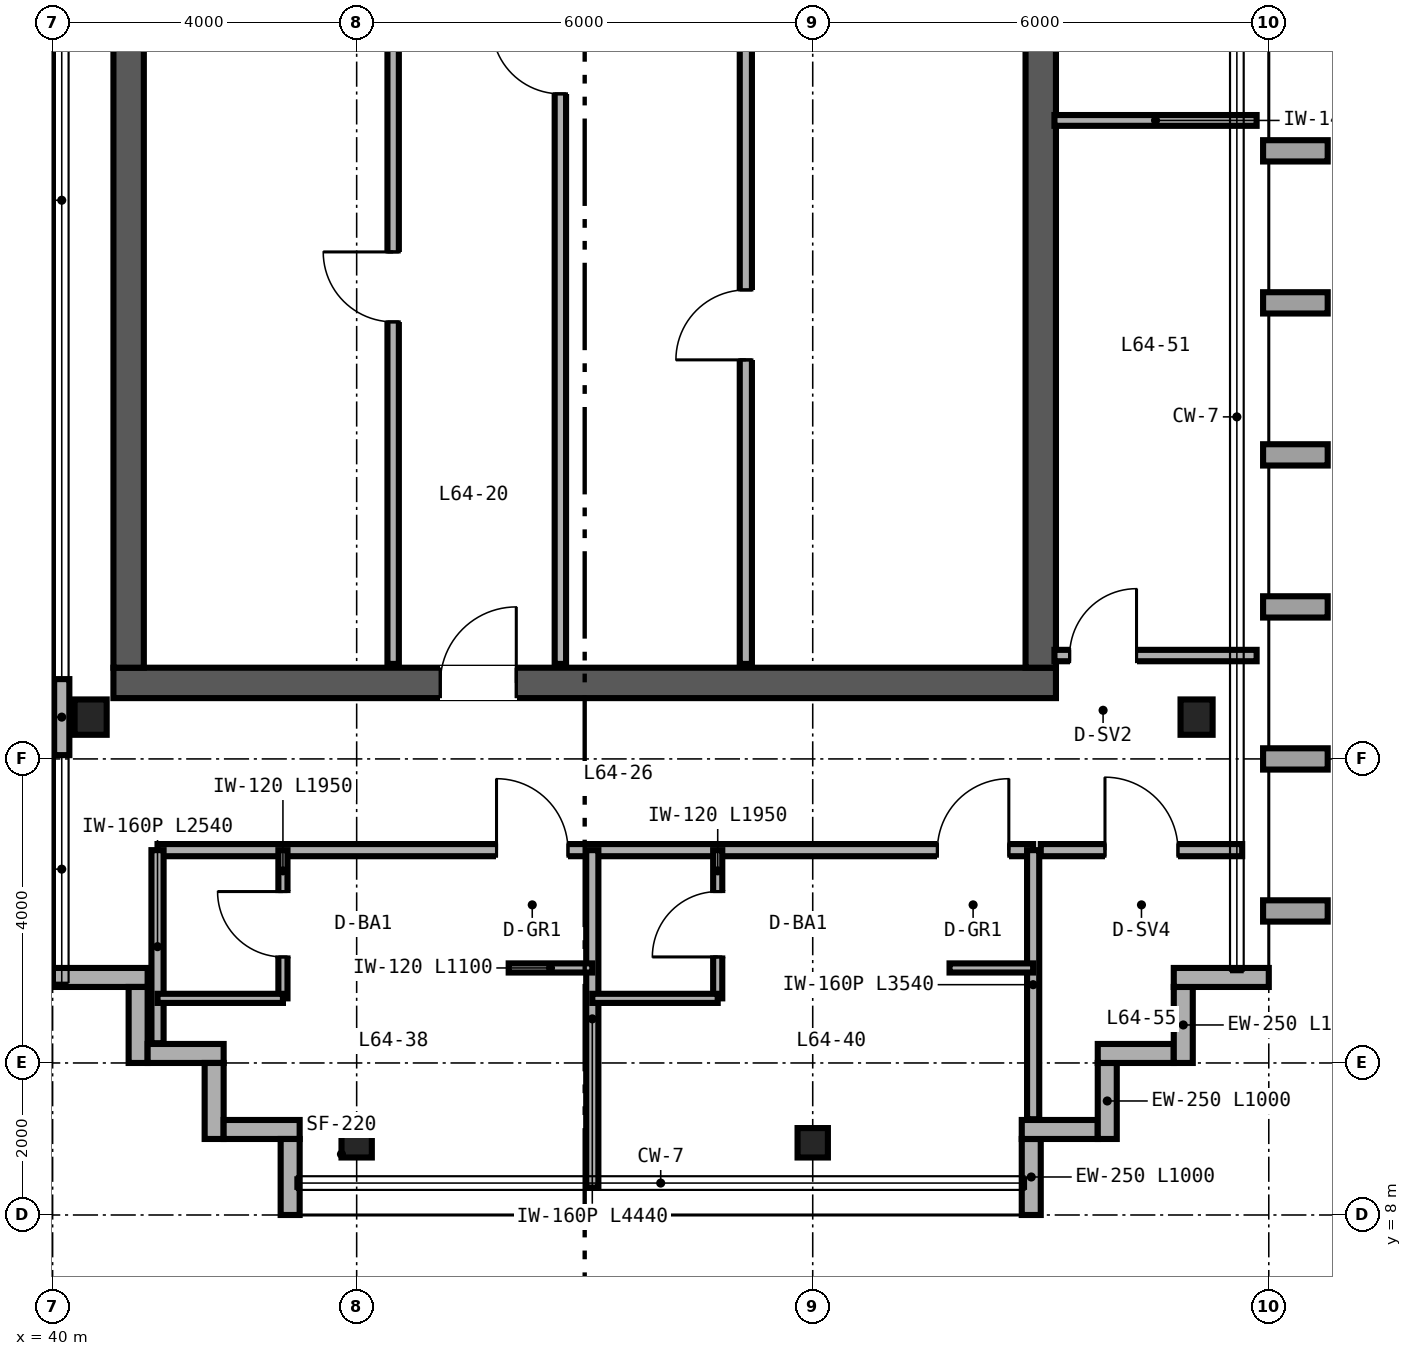
"""IFC4 building model, lengths in metres.
Left out: names, types, materials, properties, quantities, classifications, styles, units other than length and angle.
Written with IfcOpenShell. Run it as: python <this file> out.ifc"""

import sys

from ifc_helpers import new_model, si_unit, direction, frame, frame_2d, origin, origin_2d, place, context, subcontext, project, spatial, rectangle, i_section, extrude, source, transform, mapped, element, fill, save


model = new_model("IFC4")
c1 = context("Model", 3, precision=1e-05, world=origin(), true_north=direction((0.0, 1.0)))
c2 = subcontext(c1, "Body", "Model", "MODEL_VIEW")
j1 = project(units=[si_unit("LENGTHUNIT", "METRE"), si_unit("PLANEANGLEUNIT", "RADIAN")], contexts=[c1])
p1 = place(None, origin())
s1 = spatial("IfcSite", under=j1, at=p1, CompositionType="ELEMENT")
p2 = place(p1, origin())
s2 = spatial("IfcBuilding", under=s1, at=p2, CompositionType="ELEMENT")
p3 = place(p2, frame((0.0, 0.0, 254.4)))
s3 = spatial("IfcBuildingStorey", under=s2, at=p3, CompositionType="ELEMENT", Elevation=254.4)
p4 = place(p3, frame((40.8, 15.0, 0.0), z_axis=(0.0, 0.0, 1.0), x_axis=(1.0, 0.0, 0.0)))
e1 = element("IfcWall", 1, at=p4, inside=s3, PredefinedType="SHEAR", context=c2, shape_type="SweptSolid", body=[
    extrude(rectangle(XDim=12.4, YDim=0.4, at=frame_2d((6.2, 0.0))), origin(), (0.0, 0.0, 1.0), 3.38),
])
p5 = place(p4, frame((4.3, 0.0, 0.0)))
e2 = element("IfcOpeningElement", 2, at=p5, cuts=e1, PredefinedType="OPENING", context=c2, shape_type="SweptSolid", body=[
    extrude(rectangle(XDim=1.0, YDim=2.15, at=frame_2d((0.5, 1.075))), frame((0.0, 0.21, 0.0), z_axis=(0.0, -1.0, 0.0), x_axis=(1.0, 0.0, 0.0)), (0.0, 0.0, 1.0), 0.42),
])
for number, where, z_axis, x_axis in (
    (3, (41.0, 15.2, 0.0), (0.0, 0.0, 1.0), (0.0, 1.0, 0.0)),
    (4, (53.0, 15.2, 0.0), (0.0, 0.0, 1.0), (0.0, 1.0, 0.0)),
):
    element("IfcWall", number, at=place(p3, frame(where, z_axis=z_axis, x_axis=x_axis)), inside=s3, PredefinedType="SHEAR", context=c2, shape_type="SweptSolid", body=[
        extrude(rectangle(XDim=21.6, YDim=0.4, at=frame_2d((10.8, 0.0))), origin(), (0.0, 0.0, 1.0), 3.38),
    ])
m1 = source(origin(), c2, "Body", "SweptSolid", [
    extrude(i_section(OverallWidth=0.422, OverallDepth=0.465, WebThickness=0.045, FlangeThickness=0.073, FilletRadius=0.025, at=origin_2d()), origin(), (0.0, 0.0, 1.0), 3.38),
])
for number, where, z_axis, x_axis in (
    (5, (40.5, 14.55, 0.0), (0.0, 0.0, 1.0), (1.0, 0.0, 0.0)),
    (6, (55.05, 14.55, 0.0), (0.0, 0.0, 1.0), (1.0, 0.0, 0.0)),
):
    element("IfcColumn", number, at=place(p3, frame(where, z_axis=z_axis, x_axis=x_axis)), inside=s3, PredefinedType="COLUMN", context=c2, shape_type="MappedRepresentation", body=[
        mapped(m1, transform((0.0, 0.0, 0.0), scale=1.0)),
    ])
m2 = source(origin(), c2, "Body", "SweptSolid", [
    extrude(i_section(OverallWidth=0.399, OverallDepth=0.387, WebThickness=0.021, FlangeThickness=0.033, FilletRadius=0.025, at=origin_2d()), origin(), (0.0, 0.0, 1.0), 3.38),
])
for number, where, z_axis, x_axis in (
    (7, (44.0, 8.95, 0.0), (0.0, 0.0, 1.0), (1.0, 0.0, 0.0)),
    (8, (50.0, 8.95, 0.0), (0.0, 0.0, 1.0), (1.0, 0.0, 0.0)),
):
    element("IfcColumn", number, at=place(p3, frame(where, z_axis=z_axis, x_axis=x_axis)), inside=s3, PredefinedType="COLUMN", context=c2, shape_type="MappedRepresentation", body=[
        mapped(m2, transform((0.0, 0.0, 0.0), scale=1.0)),
    ])
for number, where, z_axis, x_axis in (
    (9, (52.875, 8.0, 0.0), (0.0, 0.0, 1.0), (0.0, 1.0, 0.0)),
    (10, (52.75, 9.125, 0.0), (0.0, 0.0, 1.0), (1.0, 0.0, 0.0)),
    (11, (53.875, 9.0, 0.0), (0.0, 0.0, 1.0), (0.0, 1.0, 0.0)),
    (12, (53.75, 10.125, 0.0), (0.0, 0.0, 1.0), (1.0, 0.0, 0.0)),
    (13, (54.875, 10.0, 0.0), (0.0, 0.0, 1.0), (0.0, 1.0, 0.0)),
):
    element("IfcWall", number, at=place(p3, frame(where, z_axis=z_axis, x_axis=x_axis)), inside=s3, PredefinedType="SOLIDWALL", context=c2, shape_type="SweptSolid", body=[
        extrude(rectangle(XDim=1.0, YDim=0.25, at=frame_2d((0.5, 0.0))), origin(), (0.0, 0.0, 1.0), 3.38),
    ])
for number, where, z_axis, x_axis in (
    (14, (54.75, 11.125, 0.0), (0.0, 0.0, 1.0), (1.0, 0.0, 0.0)),
    (15, (40.0, 11.125, 0.0), (0.0, 0.0, 1.0), (1.0, 0.0, 0.0)),
):
    element("IfcWall", number, at=place(p3, frame(where, z_axis=z_axis, x_axis=x_axis)), inside=s3, PredefinedType="SOLIDWALL", context=c2, shape_type="SweptSolid", body=[
        extrude(rectangle(XDim=1.25, YDim=0.25, at=frame_2d((0.625, 0.0))), origin(), (0.0, 0.0, 1.0), 3.38),
    ])
for number, where, z_axis, x_axis in (
    (16, (41.125, 11.0, 0.0), (0.0, 0.0, 1.0), (0.0, -1.0, 0.0)),
    (17, (41.25, 10.125, 0.0), (0.0, 0.0, 1.0), (1.0, 0.0, 0.0)),
    (18, (42.125, 10.0, 0.0), (0.0, 0.0, 1.0), (0.0, -1.0, 0.0)),
    (19, (42.25, 9.125, 0.0), (0.0, 0.0, 1.0), (1.0, 0.0, 0.0)),
    (20, (43.125, 9.0, 0.0), (0.0, 0.0, 1.0), (0.0, -1.0, 0.0)),
):
    element("IfcWall", number, at=place(p3, frame(where, z_axis=z_axis, x_axis=x_axis)), inside=s3, PredefinedType="SOLIDWALL", context=c2, shape_type="SweptSolid", body=[
        extrude(rectangle(XDim=1.0, YDim=0.25, at=frame_2d((0.5, 0.0))), origin(), (0.0, 0.0, 1.0), 3.38),
    ])
p6 = place(p3, frame((40.12, 14.05, 0.0), z_axis=(0.0, 0.0, 1.0), x_axis=(0.0, 1.0, 0.0)))
e21 = element("IfcWall", 21, at=p6, inside=s3, PredefinedType="PARAPET", context=c2, shape_type="SweptSolid", body=[
    extrude(rectangle(XDim=1.0, YDim=0.2, at=frame_2d((0.5, 0.0))), origin(), (0.0, 0.0, 1.0), 3.38),
])
p7 = place(p3, frame((46.68, 15.25, 0.0), z_axis=(0.0, 0.0, 1.0), x_axis=(0.0, 1.0, 0.0)))
e22 = element("IfcWall", 22, at=p7, inside=s3, PredefinedType="PARTITIONING", context=c2, shape_type="SweptSolid", body=[
    extrude(rectangle(XDim=16.13, YDim=0.15, at=frame_2d((8.065, 0.0))), origin(), (0.0, 0.0, 1.0), 2.453),
])
p8 = place(p7, frame((7.5, 0.0, 0.0)))
e23 = element("IfcOpeningElement", 23, at=p8, cuts=e22, PredefinedType="OPENING", context=c2, shape_type="SweptSolid", body=[
    extrude(rectangle(XDim=0.9, YDim=2.15, at=frame_2d((0.45, 1.075))), frame((0.0, 0.085, 0.0), z_axis=(0.0, -1.0, 0.0), x_axis=(1.0, 0.0, 0.0)), (0.0, 0.0, 1.0), 0.17),
])
p9 = place(p3, frame((49.12, 15.25, 0.0), z_axis=(0.0, 0.0, 1.0), x_axis=(0.0, 1.0, 0.0)))
e24 = element("IfcWall", 24, at=p9, inside=s3, PredefinedType="PARTITIONING", context=c2, shape_type="SweptSolid", body=[
    extrude(rectangle(XDim=16.13, YDim=0.16, at=frame_2d((8.065, 0.0))), origin(), (0.0, 0.0, 1.0), 2.453),
])
p10 = place(p9, frame((4.0, 0.0, 0.0)))
e25 = element("IfcOpeningElement", 25, at=p10, cuts=e24, PredefinedType="OPENING", context=c2, shape_type="SweptSolid", body=[
    extrude(rectangle(XDim=0.92, YDim=2.15, at=frame_2d((0.46, 1.075))), frame((0.0, 0.09, 0.0), z_axis=(0.0, -1.0, 0.0), x_axis=(1.0, 0.0, 0.0)), (0.0, 0.0, 1.0), 0.18),
])
p11 = place(p9, frame((12.0, 0.0, 0.0)))
e26 = element("IfcOpeningElement", 26, at=p11, cuts=e24, PredefinedType="OPENING", context=c2, shape_type="SweptSolid", body=[
    extrude(rectangle(XDim=0.92, YDim=2.15, at=frame_2d((0.46, 1.075))), frame((0.0, 0.09, 0.0), z_axis=(0.0, -1.0, 0.0), x_axis=(1.0, 0.0, 0.0)), (0.0, 0.0, 1.0), 0.18),
])
p12 = place(p3, frame((44.48, 15.25, 0.0), z_axis=(0.0, 0.0, 1.0), x_axis=(0.0, 1.0, 0.0)))
e27 = element("IfcWall", 27, at=p12, inside=s3, PredefinedType="PARTITIONING", context=c2, shape_type="SweptSolid", body=[
    extrude(rectangle(XDim=16.13, YDim=0.15, at=frame_2d((8.065, 0.0))), origin(), (0.0, 0.0, 1.0), 2.453),
])
p13 = place(p12, frame((4.5, 0.0, 0.0)))
e28 = element("IfcOpeningElement", 28, at=p13, cuts=e27, PredefinedType="OPENING", context=c2, shape_type="SweptSolid", body=[
    extrude(rectangle(XDim=0.92, YDim=2.15, at=frame_2d((0.46, 1.075))), frame((0.0, 0.085, 0.0), z_axis=(0.0, -1.0, 0.0), x_axis=(1.0, 0.0, 0.0)), (0.0, 0.0, 1.0), 0.17),
])
p14 = place(p3, frame((41.38, 12.8, 0.0), z_axis=(0.0, 0.0, 1.0), x_axis=(1.0, 0.0, 0.0)))
e29 = element("IfcWall", 29, at=p14, inside=s3, PredefinedType="PARTITIONING", context=c2, shape_type="SweptSolid", body=[
    extrude(rectangle(XDim=11.52, YDim=0.16, at=frame_2d((5.76, 0.0))), origin(), (0.0, 0.0, 1.0), 3.38),
])
p15 = place(p14, frame((4.46, 0.0, 0.0)))
e30 = element("IfcOpeningElement", 30, at=p15, cuts=e29, PredefinedType="OPENING", context=c2, shape_type="SweptSolid", body=[
    extrude(rectangle(XDim=0.94, YDim=2.15, at=frame_2d((0.47, 1.075))), frame((0.0, 0.09, 0.0), z_axis=(0.0, -1.0, 0.0), x_axis=(1.0, 0.0, 0.0)), (0.0, 0.0, 1.0), 0.18),
])
p16 = place(p14, frame((10.26, 0.0, 0.0)))
e31 = element("IfcOpeningElement", 31, at=p16, cuts=e29, PredefinedType="OPENING", context=c2, shape_type="SweptSolid", body=[
    extrude(rectangle(XDim=0.94, YDim=2.15, at=frame_2d((0.47, 1.075))), frame((0.0, 0.09, 0.0), z_axis=(0.0, -1.0, 0.0), x_axis=(1.0, 0.0, 0.0)), (0.0, 0.0, 1.0), 0.18),
])
p17 = place(p3, frame((41.38, 10.26, 0.0), z_axis=(0.0, 0.0, 1.0), x_axis=(0.0, 1.0, 0.0)))
e32 = element("IfcWall", 32, at=p17, inside=s3, PredefinedType="PARTITIONING", context=c2, shape_type="SweptSolid", body=[
    extrude(rectangle(XDim=2.54, YDim=0.16, at=frame_2d((1.27, 0.0))), origin(), (0.0, 0.0, 1.0), 3.38),
])
p18 = place(p3, frame((52.9, 9.26, 0.0), z_axis=(0.0, 0.0, 1.0), x_axis=(0.0, 1.0, 0.0)))
e33 = element("IfcWall", 33, at=p18, inside=s3, PredefinedType="PARTITIONING", context=c2, shape_type="SweptSolid", body=[
    extrude(rectangle(XDim=3.54, YDim=0.16, at=frame_2d((1.77, 0.0))), origin(), (0.0, 0.0, 1.0), 3.38),
])
p19 = place(p3, frame((47.1, 8.36, 0.0), z_axis=(0.0, 0.0, 1.0), x_axis=(0.0, 1.0, 0.0)))
e34 = element("IfcWall", 34, at=p19, inside=s3, PredefinedType="PARTITIONING", context=c2, shape_type="SweptSolid", body=[
    extrude(rectangle(XDim=4.44, YDim=0.16, at=frame_2d((2.22, 0.0))), origin(), (0.0, 0.0, 1.0), 2.687),
])
p20 = place(p3, frame((43.03, 10.85, 0.0), z_axis=(0.0, 0.0, 1.0), x_axis=(0.0, 1.0, 0.0)))
e35 = element("IfcWall", 35, at=p20, inside=s3, PredefinedType="PARTITIONING", context=c2, shape_type="SweptSolid", body=[
    extrude(rectangle(XDim=1.95, YDim=0.12, at=frame_2d((0.975, 0.0))), origin(), (0.0, 0.0, 1.0), 3.38),
])
p21 = place(p20, frame((0.545, 0.0, 0.0)))
e36 = element("IfcOpeningElement", 36, at=p21, cuts=e35, PredefinedType="OPENING", context=c2, shape_type="SweptSolid", body=[
    extrude(rectangle(XDim=0.86, YDim=2.1, at=frame_2d((0.43, 1.05))), frame((0.0, 0.07, 0.0), z_axis=(0.0, -1.0, 0.0), x_axis=(1.0, 0.0, 0.0)), (0.0, 0.0, 1.0), 0.14),
])
p22 = place(p3, frame((41.38, 10.85, 0.0), z_axis=(0.0, 0.0, 1.0), x_axis=(1.0, 0.0, 0.0)))
e37 = element("IfcWall", 37, at=p22, inside=s3, PredefinedType="PARTITIONING", context=c2, shape_type="SweptSolid", body=[
    extrude(rectangle(XDim=1.65, YDim=0.12, at=frame_2d((0.825, 0.0))), origin(), (0.0, 0.0, 1.0), 3.38),
])
p23 = place(p3, frame((46.0, 11.25, 0.0), z_axis=(0.0, 0.0, 1.0), x_axis=(1.0, 0.0, 0.0)))
e38 = element("IfcWall", 38, at=p23, inside=s3, PredefinedType="PARTITIONING", context=c2, shape_type="SweptSolid", body=[
    extrude(rectangle(XDim=1.1, YDim=0.12, at=frame_2d((0.55, 0.0))), origin(), (0.0, 0.0, 1.0), 3.38),
])
p24 = place(p3, frame((48.75, 10.85, 0.0), z_axis=(0.0, 0.0, 1.0), x_axis=(0.0, 1.0, 0.0)))
e39 = element("IfcWall", 39, at=p24, inside=s3, PredefinedType="PARTITIONING", context=c2, shape_type="SweptSolid", body=[
    extrude(rectangle(XDim=1.95, YDim=0.12, at=frame_2d((0.975, 0.0))), origin(), (0.0, 0.0, 1.0), 3.38),
])
p25 = place(p24, frame((0.545, 0.0, 0.0)))
e40 = element("IfcOpeningElement", 40, at=p25, cuts=e39, PredefinedType="OPENING", context=c2, shape_type="SweptSolid", body=[
    extrude(rectangle(XDim=0.86, YDim=2.1, at=frame_2d((0.43, 1.05))), frame((0.0, 0.07, 0.0), z_axis=(0.0, -1.0, 0.0), x_axis=(1.0, 0.0, 0.0)), (0.0, 0.0, 1.0), 0.14),
])
p26 = place(p3, frame((47.1, 10.85, 0.0), z_axis=(0.0, 0.0, 1.0), x_axis=(1.0, 0.0, 0.0)))
e41 = element("IfcWall", 41, at=p26, inside=s3, PredefinedType="PARTITIONING", context=c2, shape_type="SweptSolid", body=[
    extrude(rectangle(XDim=1.65, YDim=0.12, at=frame_2d((0.825, 0.0))), origin(), (0.0, 0.0, 1.0), 3.38),
])
p27 = place(p3, frame((51.8, 11.25, 0.0), z_axis=(0.0, 0.0, 1.0), x_axis=(1.0, 0.0, 0.0)))
e42 = element("IfcWall", 42, at=p27, inside=s3, PredefinedType="PARTITIONING", context=c2, shape_type="SweptSolid", body=[
    extrude(rectangle(XDim=1.1, YDim=0.12, at=frame_2d((0.55, 0.0))), origin(), (0.0, 0.0, 1.0), 3.38),
])
p28 = place(p3, frame((53.18, 15.36, 0.0), z_axis=(0.0, 0.0, 1.0), x_axis=(1.0, 0.0, 0.0)))
e43 = element("IfcWall", 43, at=p28, inside=s3, PredefinedType="PARTITIONING", context=c2, shape_type="SweptSolid", body=[
    extrude(rectangle(XDim=2.66, YDim=0.15, at=frame_2d((1.33, 0.0))), origin(), (0.0, 0.0, 1.0), 2.601),
])
p29 = place(p28, frame((0.2, 0.0, 0.0)))
e44 = element("IfcOpeningElement", 44, at=p29, cuts=e43, PredefinedType="OPENING", context=c2, shape_type="SweptSolid", body=[
    extrude(rectangle(XDim=0.88, YDim=2.15, at=frame_2d((0.44, 1.075))), frame((0.0, 0.085, 0.0), z_axis=(0.0, -1.0, 0.0), x_axis=(1.0, 0.0, 0.0)), (0.0, 0.0, 1.0), 0.17),
])
p30 = place(p3, frame((53.18, 22.4, 0.0), z_axis=(0.0, 0.0, 1.0), x_axis=(1.0, 0.0, 0.0)))
e45 = element("IfcWall", 45, at=p30, inside=s3, PredefinedType="PARTITIONING", context=c2, shape_type="SweptSolid", body=[
    extrude(rectangle(XDim=2.66, YDim=0.142, at=frame_2d((1.33, 0.0))), origin(), (0.0, 0.0, 1.0), 2.601),
])
p31 = place(p3, frame((53.0, 12.8, 0.0), z_axis=(0.0, 0.0, 1.0), x_axis=(1.0, 0.0, 0.0)))
e46 = element("IfcWall", 46, at=p31, inside=s3, PredefinedType="PARTITIONING", context=c2, shape_type="SweptSolid", body=[
    extrude(rectangle(XDim=2.65, YDim=0.16, at=frame_2d((1.325, 0.0))), origin(), (0.0, 0.0, 1.0), 3.38),
])
p32 = place(p31, frame((0.845, 0.0, 0.0)))
e47 = element("IfcOpeningElement", 47, at=p32, cuts=e46, PredefinedType="OPENING", context=c2, shape_type="SweptSolid", body=[
    extrude(rectangle(XDim=0.96, YDim=2.15, at=frame_2d((0.48, 1.075))), frame((0.0, 0.09, 0.0), z_axis=(0.0, -1.0, 0.0), x_axis=(1.0, 0.0, 0.0)), (0.0, 0.0, 1.0), 0.18),
])
m3 = source(origin(), c2, "Body", "SweptSolid", [
    extrude(rectangle(XDim=0.9, YDim=2.15, at=frame_2d((0.45, 1.075))), frame((0.0, 0.025, 0.0), z_axis=(0.0, -1.0, 0.0), x_axis=(1.0, 0.0, 0.0)), (0.0, 0.0, 1.0), 0.05),
])
p33 = place(p8, origin())
e48 = element("IfcDoor", 48, at=p33, inside=s3, OperationType="SINGLE_SWING_RIGHT", PredefinedType="DOOR", context=c2, shape_type="MappedRepresentation", body=[
    mapped(m3, transform((0.0, 0.0, 0.0), scale=1.0)),
])
fill(e23, e48)
m4 = source(origin(), c2, "Body", "SweptSolid", [
    extrude(rectangle(XDim=1.0, YDim=2.15, at=frame_2d((0.5, 1.075))), frame((0.0, 0.025, 0.0), z_axis=(0.0, -1.0, 0.0), x_axis=(1.0, 0.0, 0.0)), (0.0, 0.0, 1.0), 0.05),
])
p34 = place(p5, origin())
e49 = element("IfcDoor", 49, at=p34, inside=s3, OperationType="SINGLE_SWING_RIGHT", PredefinedType="DOOR", context=c2, shape_type="MappedRepresentation", body=[
    mapped(m4, transform((0.0, 0.0, 0.0), scale=1.0)),
])
fill(e2, e49)
m5 = source(origin(), c2, "Body", "SweptSolid", [
    extrude(rectangle(XDim=0.92, YDim=2.15, at=frame_2d((0.46, 1.075))), frame((0.0, 0.025, 0.0), z_axis=(0.0, -1.0, 0.0), x_axis=(1.0, 0.0, 0.0)), (0.0, 0.0, 1.0), 0.05),
])
p35 = place(p10, origin())
e50 = element("IfcDoor", 50, at=p35, inside=s3, OperationType="SINGLE_SWING_LEFT", PredefinedType="DOOR", context=c2, shape_type="MappedRepresentation", body=[
    mapped(m5, transform((0.0, 0.0, 0.0), scale=1.0)),
])
fill(e25, e50)
p36 = place(p13, origin())
e51 = element("IfcDoor", 51, at=p36, inside=s3, OperationType="SINGLE_SWING_RIGHT", PredefinedType="DOOR", context=c2, shape_type="MappedRepresentation", body=[
    mapped(m5, transform((0.0, 0.0, 0.0), scale=1.0)),
])
fill(e28, e51)
m6 = source(origin(), c2, "Body", "SweptSolid", [
    extrude(rectangle(XDim=0.86, YDim=2.1, at=frame_2d((0.43, 1.05))), frame((0.0, 0.025, 0.0), z_axis=(0.0, -1.0, 0.0), x_axis=(1.0, 0.0, 0.0)), (0.0, 0.0, 1.0), 0.05),
])
p37 = place(p21, origin())
e52 = element("IfcDoor", 52, at=p37, inside=s3, OperationType="SINGLE_SWING_RIGHT", PredefinedType="DOOR", context=c2, shape_type="MappedRepresentation", body=[
    mapped(m6, transform((0.0, 0.0, 0.0), scale=1.0)),
])
fill(e36, e52)
p38 = place(p25, origin())
e53 = element("IfcDoor", 53, at=p38, inside=s3, OperationType="SINGLE_SWING_LEFT", PredefinedType="DOOR", context=c2, shape_type="MappedRepresentation", body=[
    mapped(m6, transform((0.0, 0.0, 0.0), scale=1.0)),
])
fill(e40, e53)
m7 = source(origin(), c2, "Body", "SweptSolid", [
    extrude(rectangle(XDim=0.94, YDim=2.15, at=frame_2d((0.47, 1.075))), frame((0.0, 0.025, 0.0), z_axis=(0.0, -1.0, 0.0), x_axis=(1.0, 0.0, 0.0)), (0.0, 0.0, 1.0), 0.05),
])
p39 = place(p15, origin())
e54 = element("IfcDoor", 54, at=p39, inside=s3, OperationType="SINGLE_SWING_LEFT", PredefinedType="DOOR", context=c2, shape_type="MappedRepresentation", body=[
    mapped(m7, transform((0.0, 0.0, 0.0), scale=1.0)),
])
fill(e30, e54)
p40 = place(p16, origin())
e55 = element("IfcDoor", 55, at=p40, inside=s3, OperationType="SINGLE_SWING_RIGHT", PredefinedType="DOOR", context=c2, shape_type="MappedRepresentation", body=[
    mapped(m7, transform((0.0, 0.0, 0.0), scale=1.0)),
])
fill(e31, e55)
m8 = source(origin(), c2, "Body", "SweptSolid", [
    extrude(rectangle(XDim=0.88, YDim=2.15, at=frame_2d((0.44, 1.075))), frame((0.0, 0.025, 0.0), z_axis=(0.0, -1.0, 0.0), x_axis=(1.0, 0.0, 0.0)), (0.0, 0.0, 1.0), 0.05),
])
p41 = place(p29, origin())
e56 = element("IfcDoor", 56, at=p41, inside=s3, OperationType="SINGLE_SWING_RIGHT", PredefinedType="DOOR", context=c2, shape_type="MappedRepresentation", body=[
    mapped(m8, transform((0.0, 0.0, 0.0), scale=1.0)),
])
fill(e44, e56)
m9 = source(origin(), c2, "Body", "SweptSolid", [
    extrude(rectangle(XDim=0.96, YDim=2.15, at=frame_2d((0.48, 1.075))), frame((0.0, 0.025, 0.0), z_axis=(0.0, -1.0, 0.0), x_axis=(1.0, 0.0, 0.0)), (0.0, 0.0, 1.0), 0.05),
])
p42 = place(p32, origin())
e57 = element("IfcDoor", 57, at=p42, inside=s3, OperationType="SINGLE_SWING_LEFT", PredefinedType="DOOR", context=c2, shape_type="MappedRepresentation", body=[
    mapped(m9, transform((0.0, 0.0, 0.0), scale=1.0)),
])
fill(e47, e57)
save(model, sys.argv[1])
